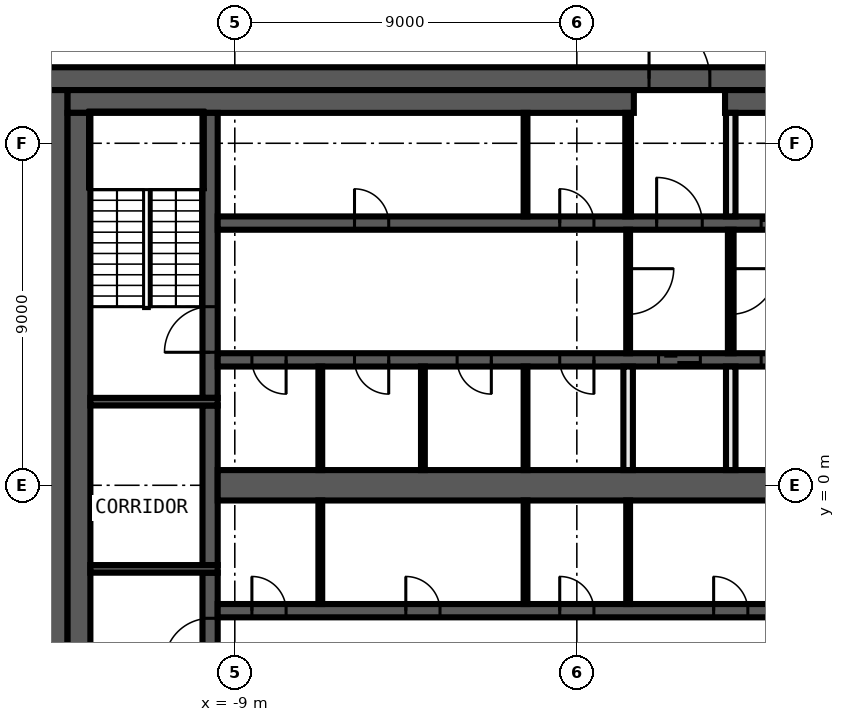
"""IFC4 building model, lengths in metres.
Left out: names, types, materials, properties, quantities, classifications, styles, units other than length and angle.
Written with IfcOpenShell. Run it as: python <this file> out.ifc"""

import sys

from ifc_helpers import new_model, si_unit, direction, frame, frame_2d, origin, place, context, subcontext, project, spatial, rectangle, extrude, element, fill, save


model = new_model("IFC4")
c1 = context("Model", 3, precision=1e-05, world=origin(), true_north=direction((0.0, 1.0)))
c2 = subcontext(c1, "Body", "Model", "MODEL_VIEW")
j1 = project(units=[si_unit("LENGTHUNIT", "METRE"), si_unit("PLANEANGLEUNIT", "RADIAN")], contexts=[c1])
p1 = place(None, origin())
s1 = spatial("IfcSite", under=j1, at=p1, CompositionType="ELEMENT")
p2 = place(p1, origin())
s2 = spatial("IfcBuilding", under=s1, at=p2, CompositionType="ELEMENT")
p3 = place(p2, frame((0.0, 0.0, 340.4)))
s3 = spatial("IfcBuildingStorey", under=s2, at=p3, CompositionType="ELEMENT", Elevation=340.4)
p4 = place(p3, frame((-14.0, 10.7, 0.0), z_axis=(0.0, 0.0, 1.0), x_axis=(1.0, 0.0, 0.0)))
e1 = element("IfcWall", 1, at=p4, inside=s3, PredefinedType="SHEAR", context=c2, shape_type="SweptSolid", body=[
    extrude(rectangle(XDim=28.0, YDim=0.6, at=frame_2d((14.0, 0.0))), origin(), (0.0, 0.0, 1.0), 3.82),
])
p5 = place(p4, frame((15.9, 0.0, 0.0)))
e2 = element("IfcOpeningElement", 2, at=p5, cuts=e1, PredefinedType="OPENING", context=c2, shape_type="SweptSolid", body=[
    extrude(rectangle(XDim=1.6, YDim=2.1, at=frame_2d((0.8, 1.05))), frame((0.0, 0.31, 0.0), z_axis=(0.0, -1.0, 0.0), x_axis=(1.0, 0.0, 0.0)), (0.0, 0.0, 1.0), 0.62),
])
p6 = place(p3, frame((-13.7, -10.4, 0.0), z_axis=(0.0, 0.0, 1.0), x_axis=(0.0, 1.0, 0.0)))
e3 = element("IfcWall", 3, at=p6, inside=s3, PredefinedType="SHEAR", context=c2, shape_type="SweptSolid", body=[
    extrude(rectangle(XDim=20.8, YDim=0.6, at=frame_2d((10.4, 0.0))), origin(), (0.0, 0.0, 1.0), 3.82),
])
p7 = place(p3, frame((-13.4, 10.1, 0.0), z_axis=(0.0, 0.0, 1.0), x_axis=(1.0, 0.0, 0.0)))
e4 = element("IfcWall", 4, at=p7, inside=s3, PredefinedType="SHEAR", context=c2, shape_type="SweptSolid", body=[
    extrude(rectangle(XDim=14.9, YDim=0.6, at=frame_2d((7.45, 0.0))), origin(), (0.0, 0.0, 1.0), 3.82),
])
p8 = place(p3, frame((3.9, 10.1, 0.0), z_axis=(0.0, 0.0, 1.0), x_axis=(1.0, 0.0, 0.0)))
e5 = element("IfcWall", 5, at=p8, inside=s3, PredefinedType="SHEAR", context=c2, shape_type="SweptSolid", body=[
    extrude(rectangle(XDim=9.5, YDim=0.6, at=frame_2d((4.75, 0.0))), origin(), (0.0, 0.0, 1.0), 3.82),
])
p9 = place(p3, frame((-13.1, -9.8, 0.0), z_axis=(0.0, 0.0, 1.0), x_axis=(0.0, 1.0, 0.0)))
e6 = element("IfcWall", 6, at=p9, inside=s3, PredefinedType="SHEAR", context=c2, shape_type="SweptSolid", body=[
    extrude(rectangle(XDim=19.6, YDim=0.6, at=frame_2d((9.8, 0.0))), origin(), (0.0, 0.0, 1.0), 3.82),
])
p10 = place(p3, frame((-9.65, -9.8, 0.0), z_axis=(0.0, 0.0, 1.0), x_axis=(0.0, 1.0, 0.0)))
e7 = element("IfcWall", 7, at=p10, inside=s3, PredefinedType="SHEAR", context=c2, shape_type="SweptSolid", body=[
    extrude(rectangle(XDim=7.5, YDim=0.4, at=frame_2d((3.75, 0.0))), origin(), (0.0, 0.0, 1.0), 3.82),
])
p11 = place(p10, frame((5.1, 0.0, 0.0)))
e8 = element("IfcOpeningElement", 8, at=p11, cuts=e7, PredefinedType="OPENING", context=c2, shape_type="SweptSolid", body=[
    extrude(rectangle(XDim=1.2, YDim=2.1, at=frame_2d((0.6, 1.05))), frame((0.0, 0.21, 0.0), z_axis=(0.0, -1.0, 0.0), x_axis=(1.0, 0.0, 0.0)), (0.0, 0.0, 1.0), 0.42),
])
p12 = place(p3, frame((-9.65, -2.1, 0.0), z_axis=(0.0, 0.0, 1.0), x_axis=(0.0, 1.0, 0.0)))
e9 = element("IfcWall", 9, at=p12, inside=s3, PredefinedType="SHEAR", context=c2, shape_type="SweptSolid", body=[
    extrude(rectangle(XDim=4.2, YDim=0.4, at=frame_2d((2.1, 0.0))), origin(), (0.0, 0.0, 1.0), 3.82),
])
p13 = place(p3, frame((-9.65, 2.3, 0.0), z_axis=(0.0, 0.0, 1.0), x_axis=(0.0, 1.0, 0.0)))
e10 = element("IfcWall", 10, at=p13, inside=s3, PredefinedType="SHEAR", context=c2, shape_type="SweptSolid", body=[
    extrude(rectangle(XDim=7.5, YDim=0.4, at=frame_2d((3.75, 0.0))), origin(), (0.0, 0.0, 1.0), 3.82),
])
p14 = place(p13, frame((1.2, 0.0, 0.0)))
e11 = element("IfcOpeningElement", 11, at=p14, cuts=e10, PredefinedType="OPENING", context=c2, shape_type="SweptSolid", body=[
    extrude(rectangle(XDim=1.2, YDim=2.1, at=frame_2d((0.6, 1.05))), frame((0.0, 0.21, 0.0), z_axis=(0.0, -1.0, 0.0), x_axis=(1.0, 0.0, 0.0)), (0.0, 0.0, 1.0), 0.42),
])
for number, where, z_axis, x_axis in (
    (12, (-9.45, 2.2, 0.0), (0.0, 0.0, 1.0), (-1.0, 0.0, 0.0)),
    (13, (-9.45, -2.2, 0.0), (0.0, 0.0, 1.0), (-1.0, 0.0, 0.0)),
):
    element("IfcWall", number, at=place(p3, frame(where, z_axis=z_axis, x_axis=x_axis)), inside=s3, PredefinedType="SHEAR", context=c2, shape_type="SweptSolid", body=[
        extrude(rectangle(XDim=3.35, YDim=0.2, at=frame_2d((1.675, 0.0))), origin(), (0.0, 0.0, 1.0), 3.82),
    ])
p15 = place(p3, frame((-9.45, 6.9, 0.0), z_axis=(0.0, 0.0, 1.0), x_axis=(1.0, 0.0, 0.0)))
e14 = element("IfcWall", 14, at=p15, inside=s3, PredefinedType="SHEAR", context=c2, shape_type="SweptSolid", body=[
    extrude(rectangle(XDim=18.9, YDim=0.35, at=frame_2d((9.45, 0.0))), origin(), (0.0, 0.0, 1.0), 3.82),
])
p16 = place(p15, frame((11.55, 0.0, 0.0)))
e15 = element("IfcOpeningElement", 15, at=p16, cuts=e14, PredefinedType="OPENING", context=c2, shape_type="SweptSolid", body=[
    extrude(rectangle(XDim=1.2, YDim=2.1, at=frame_2d((0.6, 1.05))), frame((0.0, 0.185, 0.0), z_axis=(0.0, -1.0, 0.0), x_axis=(1.0, 0.0, 0.0)), (0.0, 0.0, 1.0), 0.37),
])
p17 = place(p15, frame((14.3, 0.0, 0.0)))
e16 = element("IfcOpeningElement", 16, at=p17, cuts=e14, PredefinedType="OPENING", context=c2, shape_type="SweptSolid", body=[
    extrude(rectangle(XDim=1.1, YDim=2.1, at=frame_2d((0.55, 1.05))), frame((0.0, 0.185, 0.0), z_axis=(0.0, -1.0, 0.0), x_axis=(1.0, 0.0, 0.0)), (0.0, 0.0, 1.0), 0.37),
])
p18 = place(p15, frame((17.0, 0.0, 0.0)))
e17 = element("IfcOpeningElement", 17, at=p18, cuts=e14, PredefinedType="OPENING", context=c2, shape_type="SweptSolid", body=[
    extrude(rectangle(XDim=1.1, YDim=2.1, at=frame_2d((0.55, 1.05))), frame((0.0, 0.185, 0.0), z_axis=(0.0, -1.0, 0.0), x_axis=(1.0, 0.0, 0.0)), (0.0, 0.0, 1.0), 0.37),
])
p19 = place(p15, frame((3.6, 0.0, 0.0)))
e18 = element("IfcOpeningElement", 18, at=p19, cuts=e14, PredefinedType="OPENING", context=c2, shape_type="SweptSolid", body=[
    extrude(rectangle(XDim=0.9, YDim=2.1, at=frame_2d((0.45, 1.05))), frame((0.0, 0.185, 0.0), z_axis=(0.0, -1.0, 0.0), x_axis=(1.0, 0.0, 0.0)), (0.0, 0.0, 1.0), 0.37),
])
p20 = place(p15, frame((9.0, 0.0, 0.0)))
e19 = element("IfcOpeningElement", 19, at=p20, cuts=e14, PredefinedType="OPENING", context=c2, shape_type="SweptSolid", body=[
    extrude(rectangle(XDim=0.9, YDim=2.1, at=frame_2d((0.45, 1.05))), frame((0.0, 0.185, 0.0), z_axis=(0.0, -1.0, 0.0), x_axis=(1.0, 0.0, 0.0)), (0.0, 0.0, 1.0), 0.37),
])
p21 = place(p3, frame((9.45, 3.3, 0.0), z_axis=(0.0, 0.0, 1.0), x_axis=(-1.0, 0.0, 0.0)))
e20 = element("IfcWall", 20, at=p21, inside=s3, PredefinedType="SHEAR", context=c2, shape_type="SweptSolid", body=[
    extrude(rectangle(XDim=18.9, YDim=0.35, at=frame_2d((9.45, 0.0))), origin(), (0.0, 0.0, 1.0), 3.82),
])
p22 = place(p21, frame((6.2, 0.0, 0.0)))
e21 = element("IfcOpeningElement", 21, at=p22, cuts=e20, PredefinedType="OPENING", context=c2, shape_type="SweptSolid", body=[
    extrude(rectangle(XDim=1.1, YDim=2.1, at=frame_2d((0.55, 1.05))), frame((0.0, 0.185, 0.0), z_axis=(0.0, -1.0, 0.0), x_axis=(1.0, 0.0, 0.0)), (0.0, 0.0, 1.0), 0.37),
])
p23 = place(p21, frame((3.5, 0.0, 0.0)))
e22 = element("IfcOpeningElement", 22, at=p23, cuts=e20, PredefinedType="OPENING", context=c2, shape_type="SweptSolid", body=[
    extrude(rectangle(XDim=1.1, YDim=2.1, at=frame_2d((0.55, 1.05))), frame((0.0, 0.185, 0.0), z_axis=(0.0, -1.0, 0.0), x_axis=(1.0, 0.0, 0.0)), (0.0, 0.0, 1.0), 0.37),
])
p24 = place(p21, frame((0.9, 0.0, 0.0)))
e23 = element("IfcOpeningElement", 23, at=p24, cuts=e20, PredefinedType="OPENING", context=c2, shape_type="SweptSolid", body=[
    extrude(rectangle(XDim=0.9, YDim=2.1, at=frame_2d((0.45, 1.05))), frame((0.0, 0.185, 0.0), z_axis=(0.0, -1.0, 0.0), x_axis=(1.0, 0.0, 0.0)), (0.0, 0.0, 1.0), 0.37),
])
p25 = place(p21, frame((17.1, 0.0, 0.0)))
e24 = element("IfcOpeningElement", 24, at=p25, cuts=e20, PredefinedType="OPENING", context=c2, shape_type="SweptSolid", body=[
    extrude(rectangle(XDim=0.9, YDim=2.1, at=frame_2d((0.45, 1.05))), frame((0.0, 0.185, 0.0), z_axis=(0.0, -1.0, 0.0), x_axis=(1.0, 0.0, 0.0)), (0.0, 0.0, 1.0), 0.37),
])
p26 = place(p21, frame((14.4, 0.0, 0.0)))
e25 = element("IfcOpeningElement", 25, at=p26, cuts=e20, PredefinedType="OPENING", context=c2, shape_type="SweptSolid", body=[
    extrude(rectangle(XDim=0.9, YDim=2.1, at=frame_2d((0.45, 1.05))), frame((0.0, 0.185, 0.0), z_axis=(0.0, -1.0, 0.0), x_axis=(1.0, 0.0, 0.0)), (0.0, 0.0, 1.0), 0.37),
])
p27 = place(p21, frame((11.7, 0.0, 0.0)))
e26 = element("IfcOpeningElement", 26, at=p27, cuts=e20, PredefinedType="OPENING", context=c2, shape_type="SweptSolid", body=[
    extrude(rectangle(XDim=0.9, YDim=2.1, at=frame_2d((0.45, 1.05))), frame((0.0, 0.185, 0.0), z_axis=(0.0, -1.0, 0.0), x_axis=(1.0, 0.0, 0.0)), (0.0, 0.0, 1.0), 0.37),
])
p28 = place(p21, frame((9.0, 0.0, 0.0)))
e27 = element("IfcOpeningElement", 27, at=p28, cuts=e20, PredefinedType="OPENING", context=c2, shape_type="SweptSolid", body=[
    extrude(rectangle(XDim=0.9, YDim=2.1, at=frame_2d((0.45, 1.05))), frame((0.0, 0.185, 0.0), z_axis=(0.0, -1.0, 0.0), x_axis=(1.0, 0.0, 0.0)), (0.0, 0.0, 1.0), 0.37),
])
p29 = place(p3, frame((-9.45, -3.3, 0.0), z_axis=(0.0, 0.0, 1.0), x_axis=(1.0, 0.0, 0.0)))
e28 = element("IfcWall", 28, at=p29, inside=s3, PredefinedType="SHEAR", context=c2, shape_type="SweptSolid", body=[
    extrude(rectangle(XDim=18.9, YDim=0.35, at=frame_2d((9.45, 0.0))), origin(), (0.0, 0.0, 1.0), 3.82),
])
p30 = place(p29, frame((17.0, 0.0, 0.0)))
e29 = element("IfcOpeningElement", 29, at=p30, cuts=e28, PredefinedType="OPENING", context=c2, shape_type="SweptSolid", body=[
    extrude(rectangle(XDim=1.1, YDim=2.1, at=frame_2d((0.55, 1.05))), frame((0.0, 0.185, 0.0), z_axis=(0.0, -1.0, 0.0), x_axis=(1.0, 0.0, 0.0)), (0.0, 0.0, 1.0), 0.37),
])
p31 = place(p29, frame((0.9, 0.0, 0.0)))
e30 = element("IfcOpeningElement", 30, at=p31, cuts=e28, PredefinedType="OPENING", context=c2, shape_type="SweptSolid", body=[
    extrude(rectangle(XDim=0.9, YDim=2.1, at=frame_2d((0.45, 1.05))), frame((0.0, 0.185, 0.0), z_axis=(0.0, -1.0, 0.0), x_axis=(1.0, 0.0, 0.0)), (0.0, 0.0, 1.0), 0.37),
])
p32 = place(p29, frame((4.95, 0.0, 0.0)))
e31 = element("IfcOpeningElement", 31, at=p32, cuts=e28, PredefinedType="OPENING", context=c2, shape_type="SweptSolid", body=[
    extrude(rectangle(XDim=0.9, YDim=2.1, at=frame_2d((0.45, 1.05))), frame((0.0, 0.185, 0.0), z_axis=(0.0, -1.0, 0.0), x_axis=(1.0, 0.0, 0.0)), (0.0, 0.0, 1.0), 0.37),
])
p33 = place(p29, frame((9.0, 0.0, 0.0)))
e32 = element("IfcOpeningElement", 32, at=p33, cuts=e28, PredefinedType="OPENING", context=c2, shape_type="SweptSolid", body=[
    extrude(rectangle(XDim=0.9, YDim=2.1, at=frame_2d((0.45, 1.05))), frame((0.0, 0.185, 0.0), z_axis=(0.0, -1.0, 0.0), x_axis=(1.0, 0.0, 0.0)), (0.0, 0.0, 1.0), 0.37),
])
p34 = place(p29, frame((13.05, 0.0, 0.0)))
e33 = element("IfcOpeningElement", 33, at=p34, cuts=e28, PredefinedType="OPENING", context=c2, shape_type="SweptSolid", body=[
    extrude(rectangle(XDim=0.9, YDim=2.1, at=frame_2d((0.45, 1.05))), frame((0.0, 0.185, 0.0), z_axis=(0.0, -1.0, 0.0), x_axis=(1.0, 0.0, 0.0)), (0.0, 0.0, 1.0), 0.37),
])
p35 = place(p3, frame((-9.45, 0.0, 0.0), z_axis=(0.0, 0.0, 1.0), x_axis=(1.0, 0.0, 0.0)))
e34 = element("IfcWall", 34, at=p35, inside=s3, PredefinedType="SHEAR", context=c2, shape_type="SweptSolid", body=[
    extrude(rectangle(XDim=18.9, YDim=0.8, at=frame_2d((9.45, 0.0))), origin(), (0.0, 0.0, 1.0), 3.82),
])
p36 = place(p3, frame((4.05, 6.725, 0.0), z_axis=(0.0, 0.0, 1.0), x_axis=(0.0, -1.0, 0.0)))
e35 = element("IfcWall", 35, at=p36, inside=s3, PredefinedType="PARTITIONING", context=c2, shape_type="SweptSolid", body=[
    extrude(rectangle(XDim=3.25, YDim=0.15, at=frame_2d((1.625, 0.0))), origin(), (0.0, 0.0, 1.0), 3.82),
])
p37 = place(p36, frame((1.025, 0.0, 0.0)))
e36 = element("IfcOpeningElement", 36, at=p37, cuts=e35, PredefinedType="OPENING", context=c2, shape_type="SweptSolid", body=[
    extrude(rectangle(XDim=1.2, YDim=2.1, at=frame_2d((0.6, 1.05))), frame((0.0, 0.085, 0.0), z_axis=(0.0, -1.0, 0.0), x_axis=(1.0, 0.0, 0.0)), (0.0, 0.0, 1.0), 0.17),
])
for number, where, z_axis, x_axis in (
    (37, (4.05, 0.4, 0.0), (0.0, 0.0, 1.0), (0.0, 1.0, 0.0)),
    (38, (4.05, 7.075, 0.0), (0.0, 0.0, 1.0), (0.0, 1.0, 0.0)),
):
    element("IfcWall", number, at=place(p3, frame(where, z_axis=z_axis, x_axis=x_axis)), inside=s3, PredefinedType="SOLIDWALL", context=c2, shape_type="SweptSolid", body=[
        extrude(rectangle(XDim=2.725, YDim=0.25, at=frame_2d((1.363, 0.0))), origin(), (0.0, 0.0, 1.0), 3.82),
    ])
p38 = place(p3, frame((1.35, 7.075, 0.0), z_axis=(0.0, 0.0, 1.0), x_axis=(0.0, 1.0, 0.0)))
e39 = element("IfcWall", 39, at=p38, inside=s3, PredefinedType="PARTITIONING", context=c2, shape_type="SweptSolid", body=[
    extrude(rectangle(XDim=2.725, YDim=0.15, at=frame_2d((1.363, 0.0))), origin(), (0.0, 0.0, 1.0), 3.82),
])
p39 = place(p3, frame((1.35, -3.125, 0.0), z_axis=(0.0, 0.0, 1.0), x_axis=(0.0, 1.0, 0.0)))
e40 = element("IfcWall", 40, at=p39, inside=s3, PredefinedType="PARTITIONING", context=c2, shape_type="SweptSolid", body=[
    extrude(rectangle(XDim=2.725, YDim=0.1, at=frame_2d((1.363, 0.0))), origin(), (0.0, 0.0, 1.0), 3.82),
])
p40 = place(p3, frame((1.35, 6.725, 0.0), z_axis=(0.0, 0.0, 1.0), x_axis=(0.0, -1.0, 0.0)))
e41 = element("IfcWall", 41, at=p40, inside=s3, PredefinedType="PARTITIONING", context=c2, shape_type="SweptSolid", body=[
    extrude(rectangle(XDim=3.25, YDim=0.1, at=frame_2d((1.625, 0.0))), origin(), (0.0, 0.0, 1.0), 3.82),
])
p41 = place(p40, frame((1.025, 0.0, 0.0)))
e42 = element("IfcOpeningElement", 42, at=p41, cuts=e41, PredefinedType="OPENING", context=c2, shape_type="SweptSolid", body=[
    extrude(rectangle(XDim=1.2, YDim=2.1, at=frame_2d((0.6, 1.05))), frame((0.0, 0.06, 0.0), z_axis=(0.0, -1.0, 0.0), x_axis=(1.0, 0.0, 0.0)), (0.0, 0.0, 1.0), 0.12),
])
p42 = place(p3, frame((1.35, 0.4, 0.0), z_axis=(0.0, 0.0, 1.0), x_axis=(0.0, 1.0, 0.0)))
e43 = element("IfcWall", 43, at=p42, inside=s3, PredefinedType="SOLIDWALL", context=c2, shape_type="SweptSolid", body=[
    extrude(rectangle(XDim=2.725, YDim=0.25, at=frame_2d((1.363, 0.0))), origin(), (0.0, 0.0, 1.0), 3.82),
])
for number, where, z_axis, x_axis in (
    (44, (-1.35, -3.125, 0.0), (0.0, 0.0, 1.0), (0.0, 1.0, 0.0)),
    (45, (-1.35, 0.4, 0.0), (0.0, 0.0, 1.0), (0.0, 1.0, 0.0)),
    (46, (-1.35, 7.075, 0.0), (0.0, 0.0, 1.0), (0.0, 1.0, 0.0)),
    (47, (-4.05, 0.4, 0.0), (0.0, 0.0, 1.0), (0.0, 1.0, 0.0)),
    (48, (-6.75, -3.125, 0.0), (0.0, 0.0, 1.0), (0.0, 1.0, 0.0)),
    (49, (-6.75, 0.4, 0.0), (0.0, 0.0, 1.0), (0.0, 1.0, 0.0)),
):
    element("IfcWall", number, at=place(p3, frame(where, z_axis=z_axis, x_axis=x_axis)), inside=s3, PredefinedType="PARTITIONING", context=c2, shape_type="SweptSolid", body=[
        extrude(rectangle(XDim=2.725, YDim=0.1, at=frame_2d((1.363, 0.0))), origin(), (0.0, 0.0, 1.0), 3.82),
    ])
p43 = place(p5, origin())
e50 = element("IfcDoor", 50, at=p43, inside=s3, OperationType="DOUBLE_DOOR_SINGLE_SWING", PredefinedType="DOOR", context=c2, shape_type="SweptSolid", body=[
    extrude(rectangle(XDim=1.6, YDim=2.1, at=frame_2d((0.8, 1.05))), frame((0.0, 0.025, 0.0), z_axis=(0.0, -1.0, 0.0), x_axis=(1.0, 0.0, 0.0)), (0.0, 0.0, 1.0), 0.05),
])
fill(e2, e50)
p44 = place(p16, origin())
e51 = element("IfcDoor", 51, at=p44, inside=s3, OperationType="SINGLE_SWING_LEFT", PredefinedType="DOOR", context=c2, shape_type="SweptSolid", body=[
    extrude(rectangle(XDim=1.2, YDim=2.1, at=frame_2d((0.6, 1.05))), frame((0.0, 0.025, 0.0), z_axis=(0.0, -1.0, 0.0), x_axis=(1.0, 0.0, 0.0)), (0.0, 0.0, 1.0), 0.05),
])
fill(e15, e51)
p45 = place(p17, origin())
e52 = element("IfcDoor", 52, at=p45, inside=s3, OperationType="DOUBLE_DOOR_SLIDING", PredefinedType="DOOR", context=c2, shape_type="SweptSolid", body=[
    extrude(rectangle(XDim=1.1, YDim=2.1, at=frame_2d((0.55, 1.05))), frame((0.0, 0.025, 0.0), z_axis=(0.0, -1.0, 0.0), x_axis=(1.0, 0.0, 0.0)), (0.0, 0.0, 1.0), 0.05),
])
fill(e16, e52)
p46 = place(p22, origin())
e53 = element("IfcDoor", 53, at=p46, inside=s3, OperationType="DOUBLE_DOOR_SLIDING", PredefinedType="DOOR", context=c2, shape_type="SweptSolid", body=[
    extrude(rectangle(XDim=1.1, YDim=2.1, at=frame_2d((0.55, 1.05))), frame((0.0, 0.025, 0.0), z_axis=(0.0, -1.0, 0.0), x_axis=(1.0, 0.0, 0.0)), (0.0, 0.0, 1.0), 0.05),
])
fill(e21, e53)
p47 = place(p23, origin())
e54 = element("IfcDoor", 54, at=p47, inside=s3, OperationType="DOUBLE_DOOR_SLIDING", PredefinedType="DOOR", context=c2, shape_type="SweptSolid", body=[
    extrude(rectangle(XDim=1.1, YDim=2.1, at=frame_2d((0.55, 1.05))), frame((0.0, 0.025, 0.0), z_axis=(0.0, -1.0, 0.0), x_axis=(1.0, 0.0, 0.0)), (0.0, 0.0, 1.0), 0.05),
])
fill(e22, e54)
p48 = place(p19, origin())
e55 = element("IfcDoor", 55, at=p48, inside=s3, OperationType="SINGLE_SWING_RIGHT", PredefinedType="DOOR", context=c2, shape_type="SweptSolid", body=[
    extrude(rectangle(XDim=0.9, YDim=2.1, at=frame_2d((0.45, 1.05))), frame((0.0, 0.025, 0.0), z_axis=(0.0, -1.0, 0.0), x_axis=(1.0, 0.0, 0.0)), (0.0, 0.0, 1.0), 0.05),
])
fill(e18, e55)
p49 = place(p20, origin())
e56 = element("IfcDoor", 56, at=p49, inside=s3, OperationType="SINGLE_SWING_LEFT", PredefinedType="DOOR", context=c2, shape_type="SweptSolid", body=[
    extrude(rectangle(XDim=0.9, YDim=2.1, at=frame_2d((0.45, 1.05))), frame((0.0, 0.025, 0.0), z_axis=(0.0, -1.0, 0.0), x_axis=(1.0, 0.0, 0.0)), (0.0, 0.0, 1.0), 0.05),
])
fill(e19, e56)
p50 = place(p25, origin())
e57 = element("IfcDoor", 57, at=p50, inside=s3, OperationType="SINGLE_SWING_RIGHT", PredefinedType="DOOR", context=c2, shape_type="SweptSolid", body=[
    extrude(rectangle(XDim=0.9, YDim=2.1, at=frame_2d((0.45, 1.05))), frame((0.0, 0.025, 0.0), z_axis=(0.0, -1.0, 0.0), x_axis=(1.0, 0.0, 0.0)), (0.0, 0.0, 1.0), 0.05),
])
fill(e24, e57)
p51 = place(p26, origin())
e58 = element("IfcDoor", 58, at=p51, inside=s3, OperationType="SINGLE_SWING_LEFT", PredefinedType="DOOR", context=c2, shape_type="SweptSolid", body=[
    extrude(rectangle(XDim=0.9, YDim=2.1, at=frame_2d((0.45, 1.05))), frame((0.0, 0.025, 0.0), z_axis=(0.0, -1.0, 0.0), x_axis=(1.0, 0.0, 0.0)), (0.0, 0.0, 1.0), 0.05),
])
fill(e25, e58)
p52 = place(p27, origin())
e59 = element("IfcDoor", 59, at=p52, inside=s3, OperationType="SINGLE_SWING_RIGHT", PredefinedType="DOOR", context=c2, shape_type="SweptSolid", body=[
    extrude(rectangle(XDim=0.9, YDim=2.1, at=frame_2d((0.45, 1.05))), frame((0.0, 0.025, 0.0), z_axis=(0.0, -1.0, 0.0), x_axis=(1.0, 0.0, 0.0)), (0.0, 0.0, 1.0), 0.05),
])
fill(e26, e59)
p53 = place(p28, origin())
e60 = element("IfcDoor", 60, at=p53, inside=s3, OperationType="SINGLE_SWING_LEFT", PredefinedType="DOOR", context=c2, shape_type="SweptSolid", body=[
    extrude(rectangle(XDim=0.9, YDim=2.1, at=frame_2d((0.45, 1.05))), frame((0.0, 0.025, 0.0), z_axis=(0.0, -1.0, 0.0), x_axis=(1.0, 0.0, 0.0)), (0.0, 0.0, 1.0), 0.05),
])
fill(e27, e60)
p54 = place(p31, origin())
e61 = element("IfcDoor", 61, at=p54, inside=s3, OperationType="SINGLE_SWING_RIGHT", PredefinedType="DOOR", context=c2, shape_type="SweptSolid", body=[
    extrude(rectangle(XDim=0.9, YDim=2.1, at=frame_2d((0.45, 1.05))), frame((0.0, 0.025, 0.0), z_axis=(0.0, -1.0, 0.0), x_axis=(1.0, 0.0, 0.0)), (0.0, 0.0, 1.0), 0.05),
])
fill(e30, e61)
p55 = place(p32, origin())
e62 = element("IfcDoor", 62, at=p55, inside=s3, OperationType="SINGLE_SWING_LEFT", PredefinedType="DOOR", context=c2, shape_type="SweptSolid", body=[
    extrude(rectangle(XDim=0.9, YDim=2.1, at=frame_2d((0.45, 1.05))), frame((0.0, 0.025, 0.0), z_axis=(0.0, -1.0, 0.0), x_axis=(1.0, 0.0, 0.0)), (0.0, 0.0, 1.0), 0.05),
])
fill(e31, e62)
p56 = place(p33, origin())
e63 = element("IfcDoor", 63, at=p56, inside=s3, OperationType="SINGLE_SWING_RIGHT", PredefinedType="DOOR", context=c2, shape_type="SweptSolid", body=[
    extrude(rectangle(XDim=0.9, YDim=2.1, at=frame_2d((0.45, 1.05))), frame((0.0, 0.025, 0.0), z_axis=(0.0, -1.0, 0.0), x_axis=(1.0, 0.0, 0.0)), (0.0, 0.0, 1.0), 0.05),
])
fill(e32, e63)
p57 = place(p34, origin())
e64 = element("IfcDoor", 64, at=p57, inside=s3, OperationType="SINGLE_SWING_LEFT", PredefinedType="DOOR", context=c2, shape_type="SweptSolid", body=[
    extrude(rectangle(XDim=0.9, YDim=2.1, at=frame_2d((0.45, 1.05))), frame((0.0, 0.025, 0.0), z_axis=(0.0, -1.0, 0.0), x_axis=(1.0, 0.0, 0.0)), (0.0, 0.0, 1.0), 0.05),
])
fill(e33, e64)
p58 = place(p14, origin())
e65 = element("IfcDoor", 65, at=p58, inside=s3, OperationType="SINGLE_SWING_RIGHT", PredefinedType="DOOR", context=c2, shape_type="SweptSolid", body=[
    extrude(rectangle(XDim=1.2, YDim=2.1, at=frame_2d((0.6, 1.05))), frame((0.0, 0.025, 0.0), z_axis=(0.0, -1.0, 0.0), x_axis=(1.0, 0.0, 0.0)), (0.0, 0.0, 1.0), 0.05),
])
fill(e11, e65)
p59 = place(p11, origin())
e66 = element("IfcDoor", 66, at=p59, inside=s3, OperationType="SINGLE_SWING_LEFT", PredefinedType="DOOR", context=c2, shape_type="SweptSolid", body=[
    extrude(rectangle(XDim=1.2, YDim=2.1, at=frame_2d((0.6, 1.05))), frame((0.0, 0.025, 0.0), z_axis=(0.0, -1.0, 0.0), x_axis=(1.0, 0.0, 0.0)), (0.0, 0.0, 1.0), 0.05),
])
fill(e8, e66)
p60 = place(p41, origin())
e67 = element("IfcDoor", 67, at=p60, inside=s3, OperationType="SINGLE_SWING_LEFT", PredefinedType="DOOR", context=c2, shape_type="SweptSolid", body=[
    extrude(rectangle(XDim=1.2, YDim=2.1, at=frame_2d((0.6, 1.05))), frame((0.0, 0.025, 0.0), z_axis=(0.0, -1.0, 0.0), x_axis=(1.0, 0.0, 0.0)), (0.0, 0.0, 1.0), 0.05),
])
fill(e42, e67)
p61 = place(p37, origin())
e68 = element("IfcDoor", 68, at=p61, inside=s3, OperationType="SINGLE_SWING_RIGHT", PredefinedType="DOOR", context=c2, shape_type="SweptSolid", body=[
    extrude(rectangle(XDim=1.2, YDim=2.1, at=frame_2d((0.6, 1.05))), frame((0.0, 0.025, 0.0), z_axis=(0.0, -1.0, 0.0), x_axis=(1.0, 0.0, 0.0)), (0.0, 0.0, 1.0), 0.05),
])
fill(e36, e68)
save(model, sys.argv[1])
